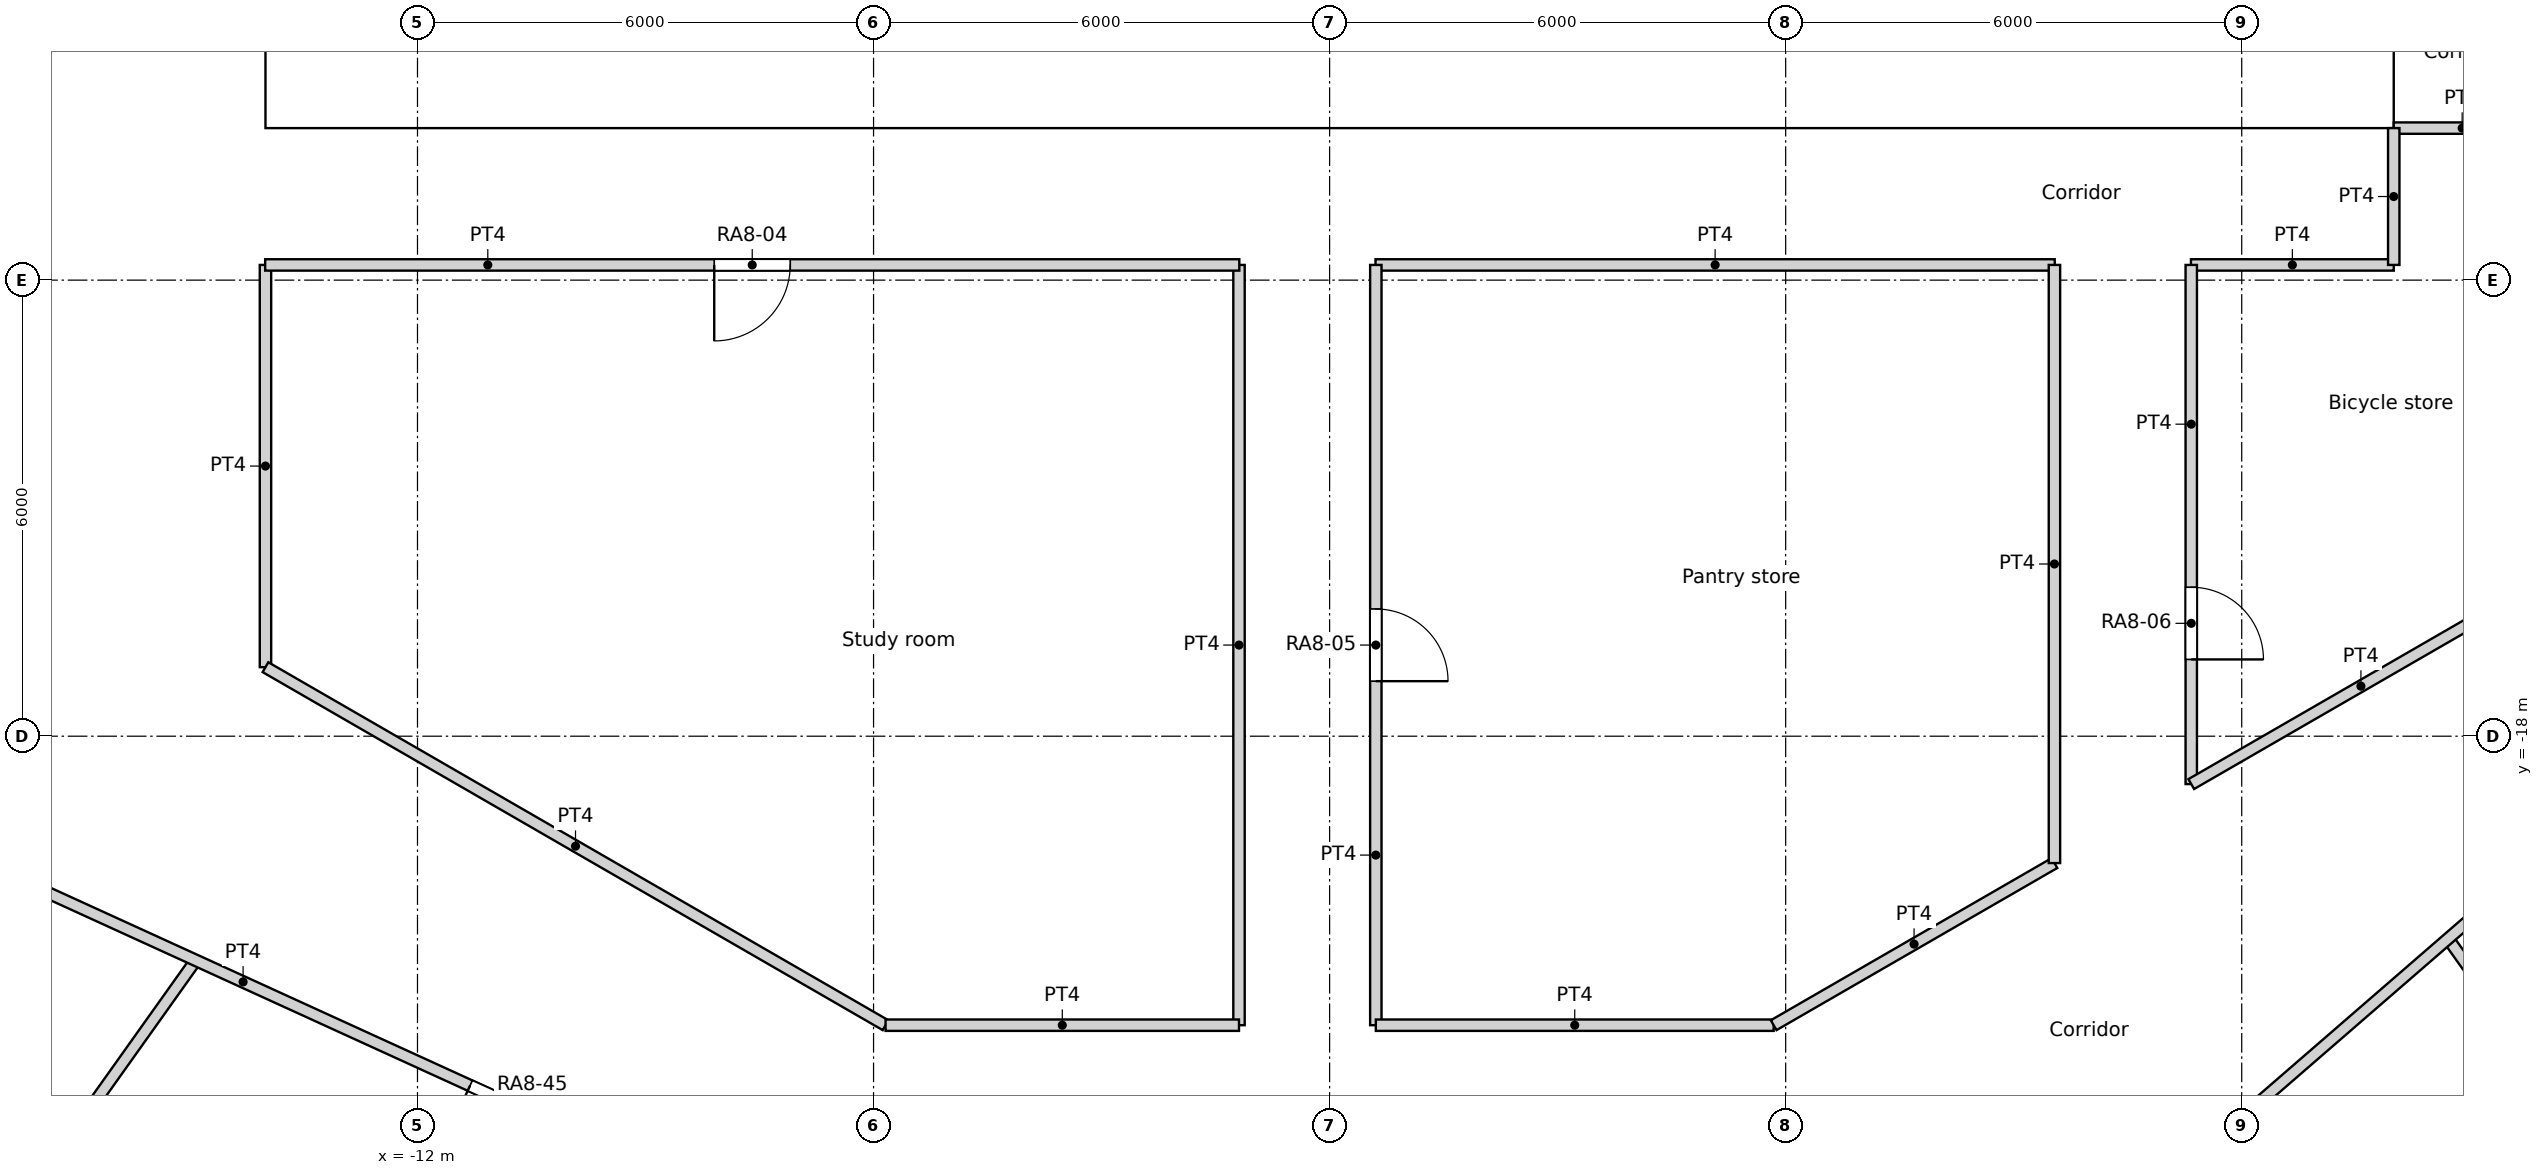
"""IFC4 building model, lengths in metres.
Left out: names, types, materials, properties, quantities, classifications, styles, units other than length and angle.
Written with IfcOpenShell. Run it as: python <this file> out.ifc"""

import sys

from ifc_helpers import new_model, si_unit, direction, frame, frame_2d, origin, origin_2d, place, context, subcontext, project, spatial, rectangle, circle, extrude, element, fill, save


model = new_model("IFC4")
c1 = context("Model", 3, precision=1e-05, world=origin(), true_north=direction((0.0, 1.0)))
c2 = subcontext(c1, "Body", "Model", "MODEL_VIEW")
j1 = project(units=[si_unit("LENGTHUNIT", "METRE"), si_unit("PLANEANGLEUNIT", "RADIAN")], contexts=[c1])
p1 = place(None, origin())
s1 = spatial("IfcSite", under=j1, at=p1, CompositionType="ELEMENT")
p2 = place(p1, origin())
s2 = spatial("IfcBuilding", under=s1, at=p2, CompositionType="ELEMENT")
p3 = place(p2, frame((0.0, 0.0, 103.8)))
s3 = spatial("IfcBuildingStorey", under=s2, at=p3, CompositionType="ELEMENT", Elevation=103.8)
for number, where, z_axis, x_axis in (
    (1, (-16.846, -17.855, 0.0), (0.0, 0.0, 1.0), (1.0, 0.0, 0.0)),
    (2, (-12.274, -21.259, 0.0), (0.0, 0.0, 1.0), (1.0, 0.0, 0.0)),
    (3, (9.723, -22.54, 0.0), (0.0, 0.0, 1.0), (1.0, 0.0, 0.0)),
    (4, (14.659, -19.69, 0.0), (0.0, 0.0, 1.0), (1.0, 0.0, 0.0)),
):
    element("IfcColumn", number, at=place(p3, frame(where, z_axis=z_axis, x_axis=x_axis)), inside=s3, PredefinedType="COLUMN", context=c2, shape_type="SweptSolid", body=[
        extrude(circle(Radius=0.65, at=origin_2d()), origin(), (0.0, 0.0, 1.0), 3.6),
    ])
for number, where, z_axis, x_axis in (
    (5, (-13.798, -12.802, 0.0), (0.0, 0.0, 1.0), (1.0, 0.0, 0.0)),
    (6, (-9.411, -16.301, 0.0), (0.0, 0.0, 1.0), (1.0, 0.0, 0.0)),
    (7, (-4.188, -18.35, 0.0), (0.0, 0.0, 1.0), (1.0, 0.0, 0.0)),
    (8, (1.406, -18.77, 0.0), (0.0, 0.0, 1.0), (1.0, 0.0, 0.0)),
    (9, (6.876, -17.521, 0.0), (0.0, 0.0, 1.0), (1.0, 0.0, 0.0)),
    (10, (11.735, -14.716, 0.0), (0.0, 0.0, 1.0), (1.0, 0.0, 0.0)),
    (11, (15.552, -10.603, 0.0), (0.0, 0.0, 1.0), (1.0, 0.0, 0.0)),
):
    element("IfcColumn", number, at=place(p3, frame(where, z_axis=z_axis, x_axis=x_axis)), inside=s3, PredefinedType="COLUMN", context=c2, shape_type="SweptSolid", body=[
        extrude(circle(Radius=0.7, at=origin_2d()), origin(), (0.0, 0.0, 1.0), 3.6),
    ])
p4 = place(p3, frame((-14.0, -9.4, 0.0), z_axis=(0.0, 0.0, 1.0), x_axis=(1.0, 0.0, 0.0)))
e12 = element("IfcWall", 12, at=p4, inside=s3, PredefinedType="SOLIDWALL", context=c2, shape_type="SweptSolid", body=[
    extrude(rectangle(XDim=28.0, YDim=1.2, at=frame_2d((14.0, 0.0))), origin(), (0.0, 0.0, 1.0), 3.6),
])
p5 = place(p4, frame((14.9, 0.0, 0.0)))
e13 = element("IfcOpeningElement", 13, at=p5, cuts=e12, PredefinedType="OPENING", context=c2, shape_type="SweptSolid", body=[
    extrude(rectangle(XDim=1.0, YDim=2.1, at=frame_2d((0.5, 1.05))), frame((0.0, 0.6, 0.0), z_axis=(0.0, -1.0, 0.0), x_axis=(1.0, 0.0, 0.0)), (0.0, 0.0, 1.0), 1.2),
])
p6 = place(p4, frame((9.8, 0.0, 0.0)))
e14 = element("IfcOpeningElement", 14, at=p6, cuts=e12, PredefinedType="OPENING", context=c2, shape_type="SweptSolid", body=[
    extrude(rectangle(XDim=1.8, YDim=2.1, at=frame_2d((0.9, 1.05))), frame((0.0, 0.6, 0.0), z_axis=(0.0, -1.0, 0.0), x_axis=(1.0, 0.0, 0.0)), (0.0, 0.0, 1.0), 1.2),
])
p7 = place(p4, frame((16.4, 0.0, 0.0)))
e15 = element("IfcOpeningElement", 15, at=p7, cuts=e12, PredefinedType="OPENING", context=c2, shape_type="SweptSolid", body=[
    extrude(rectangle(XDim=1.8, YDim=2.1, at=frame_2d((0.9, 1.05))), frame((0.0, 0.6, 0.0), z_axis=(0.0, -1.0, 0.0), x_axis=(1.0, 0.0, 0.0)), (0.0, 0.0, 1.0), 1.2),
])
p8 = place(p3, frame((-14.004, -11.8, 0.0), z_axis=(0.0, 0.0, 1.0), x_axis=(1.0, 0.0, 0.0)))
e16 = element("IfcWall", 16, at=p8, inside=s3, PredefinedType="PARTITIONING", context=c2, shape_type="SweptSolid", body=[
    extrude(rectangle(XDim=12.816, YDim=0.15, at=frame_2d((6.408, 0.0))), origin(), (0.0, 0.0, 1.0), 3.15),
])
p9 = place(p8, frame((5.908, 0.0, 0.0)))
e17 = element("IfcOpeningElement", 17, at=p9, cuts=e16, PredefinedType="OPENING", context=c2, shape_type="SweptSolid", body=[
    extrude(rectangle(XDim=1.0, YDim=2.04, at=frame_2d((0.5, 1.02))), frame((0.0, 0.075, 0.0), z_axis=(0.0, -1.0, 0.0), x_axis=(1.0, 0.0, 0.0)), (0.0, 0.0, 1.0), 0.15),
])
p10 = place(p3, frame((0.604, -11.8, 0.0), z_axis=(0.0, 0.0, 1.0), x_axis=(1.0, 0.0, 0.0)))
e18 = element("IfcWall", 18, at=p10, inside=s3, PredefinedType="PARTITIONING", context=c2, shape_type="SweptSolid", body=[
    extrude(rectangle(XDim=8.936, YDim=0.15, at=frame_2d((4.468, 0.0))), origin(), (0.0, 0.0, 1.0), 3.15),
])
p11 = place(p3, frame((14.0, -11.8, 0.0), z_axis=(0.0, 0.0, 1.0), x_axis=(0.0, 1.0, 0.0)))
e19 = element("IfcWall", 19, at=p11, inside=s3, PredefinedType="PARTITIONING", context=c2, shape_type="SweptSolid", body=[
    extrude(rectangle(XDim=1.8, YDim=0.15, at=frame_2d((0.9, 0.0))), origin(), (0.0, 0.0, 1.0), 3.15),
])
p12 = place(p3, frame((11.332, -11.8, 0.0), z_axis=(0.0, 0.0, 1.0), x_axis=(1.0, 0.0, 0.0)))
e20 = element("IfcWall", 20, at=p12, inside=s3, PredefinedType="PARTITIONING", context=c2, shape_type="SweptSolid", body=[
    extrude(rectangle(XDim=2.668, YDim=0.15, at=frame_2d((1.334, 0.0))), origin(), (0.0, 0.0, 1.0), 3.15),
])
p13 = place(p3, frame((14.0, -10.0, 0.0), z_axis=(0.0, 0.0, 1.0), x_axis=(1.0, 0.0, 0.0)))
e21 = element("IfcWall", 21, at=p13, inside=s3, PredefinedType="PARTITIONING", context=c2, shape_type="SweptSolid", body=[
    extrude(rectangle(XDim=1.8, YDim=0.15, at=frame_2d((0.9, 0.0))), origin(), (0.0, 0.0, 1.0), 3.15),
])
p14 = place(p3, frame((10.933, -23.94, 0.0), z_axis=(0.0, 0.0, 1.0), x_axis=(0.755770011705, 0.654837147242, 0.0)))
e22 = element("IfcWall", 22, at=p14, inside=s3, PredefinedType="PARTITIONING", context=c2, shape_type="SweptSolid", body=[
    extrude(rectangle(XDim=14.83, YDim=0.15, at=frame_2d((7.415, 0.0))), origin(), (0.0, 0.0, 1.0), 3.15),
])
p15 = place(p14, frame((11.976, 0.0, 0.0)))
e23 = element("IfcOpeningElement", 23, at=p15, cuts=e22, PredefinedType="OPENING", context=c2, shape_type="SweptSolid", body=[
    extrude(rectangle(XDim=1.8, YDim=2.1, at=frame_2d((0.9, 1.05))), frame((0.0, 0.075, 0.0), z_axis=(0.0, -1.0, 0.0), x_axis=(1.0, 0.0, 0.0)), (0.0, 0.0, 1.0), 0.15),
])
p16 = place(p3, frame((-14.0, -17.092, 0.0), z_axis=(0.0, 0.0, 1.0), x_axis=(0.0, 1.0, 0.0)))
e24 = element("IfcWall", 24, at=p16, inside=s3, PredefinedType="PARTITIONING", context=c2, shape_type="SweptSolid", body=[
    extrude(rectangle(XDim=5.292, YDim=0.15, at=frame_2d((2.646, 0.0))), origin(), (0.0, 0.0, 1.0), 3.15),
])
p17 = place(p3, frame((-14.0, -17.092, 0.0), z_axis=(0.0, 0.0, 1.0), x_axis=(0.86602719091, -0.499996904595, 0.0)))
e25 = element("IfcWall", 25, at=p17, inside=s3, PredefinedType="PARTITIONING", context=c2, shape_type="SweptSolid", body=[
    extrude(rectangle(XDim=9.42, YDim=0.15, at=frame_2d((4.71, 0.0))), origin(), (0.0, 0.0, 1.0), 3.15),
])
p18 = place(p3, frame((-5.842, -21.802, 0.0), z_axis=(0.0, 0.0, 1.0), x_axis=(1.0, 0.0, 0.0)))
e26 = element("IfcWall", 26, at=p18, inside=s3, PredefinedType="PARTITIONING", context=c2, shape_type="SweptSolid", body=[
    extrude(rectangle(XDim=4.65, YDim=0.15, at=frame_2d((2.325, 0.0))), origin(), (0.0, 0.0, 1.0), 3.15),
])
p19 = place(p3, frame((-1.192, -21.802, 0.0), z_axis=(0.0, 0.0, 1.0), x_axis=(0.0, 1.0, 0.0)))
e27 = element("IfcWall", 27, at=p19, inside=s3, PredefinedType="PARTITIONING", context=c2, shape_type="SweptSolid", body=[
    extrude(rectangle(XDim=10.002, YDim=0.15, at=frame_2d((5.001, 0.0))), origin(), (0.0, 0.0, 1.0), 3.15),
])
p20 = place(p3, frame((0.608, -21.802, 0.0), z_axis=(0.0, 0.0, 1.0), x_axis=(0.0, 1.0, 0.0)))
e28 = element("IfcWall", 28, at=p20, inside=s3, PredefinedType="PARTITIONING", context=c2, shape_type="SweptSolid", body=[
    extrude(rectangle(XDim=10.002, YDim=0.15, at=frame_2d((5.001, 0.0))), origin(), (0.0, 0.0, 1.0), 3.15),
])
p21 = place(p20, frame((4.526, 0.0, 0.0)))
e29 = element("IfcOpeningElement", 29, at=p21, cuts=e28, PredefinedType="OPENING", context=c2, shape_type="SweptSolid", body=[
    extrude(rectangle(XDim=0.95, YDim=2.1, at=frame_2d((0.475, 1.05))), frame((0.0, 0.075, 0.0), z_axis=(0.0, -1.0, 0.0), x_axis=(1.0, 0.0, 0.0)), (0.0, 0.0, 1.0), 0.15),
])
p22 = place(p3, frame((0.608, -21.802, 0.0), z_axis=(0.0, 0.0, 1.0), x_axis=(1.0, 0.0, 0.0)))
e30 = element("IfcWall", 30, at=p22, inside=s3, PredefinedType="PARTITIONING", context=c2, shape_type="SweptSolid", body=[
    extrude(rectangle(XDim=5.234, YDim=0.15, at=frame_2d((2.617, 0.0))), origin(), (0.0, 0.0, 1.0), 3.15),
])
p23 = place(p3, frame((5.842, -21.802, 0.0), z_axis=(0.0, 0.0, 1.0), x_axis=(0.865983505205, 0.500072563448, 0.0)))
e31 = element("IfcWall", 31, at=p23, inside=s3, PredefinedType="PARTITIONING", context=c2, shape_type="SweptSolid", body=[
    extrude(rectangle(XDim=4.265, YDim=0.15, at=frame_2d((2.133, 0.0))), origin(), (0.0, 0.0, 1.0), 3.15),
])
p24 = place(p3, frame((9.536, -19.669, 0.0), z_axis=(0.0, 0.0, 1.0), x_axis=(0.0, 1.0, 0.0)))
e32 = element("IfcWall", 32, at=p24, inside=s3, PredefinedType="PARTITIONING", context=c2, shape_type="SweptSolid", body=[
    extrude(rectangle(XDim=7.869, YDim=0.15, at=frame_2d((3.935, 0.0))), origin(), (0.0, 0.0, 1.0), 3.15),
])
p25 = place(p3, frame((11.336, -18.63, 0.0), z_axis=(0.0, 0.0, 1.0), x_axis=(0.0, 1.0, 0.0)))
e33 = element("IfcWall", 33, at=p25, inside=s3, PredefinedType="PARTITIONING", context=c2, shape_type="SweptSolid", body=[
    extrude(rectangle(XDim=6.83, YDim=0.15, at=frame_2d((3.415, 0.0))), origin(), (0.0, 0.0, 1.0), 3.15),
])
p26 = place(p25, frame((1.64, 0.0, 0.0)))
e34 = element("IfcOpeningElement", 34, at=p26, cuts=e33, PredefinedType="OPENING", context=c2, shape_type="SweptSolid", body=[
    extrude(rectangle(XDim=0.95, YDim=2.1, at=frame_2d((0.475, 1.05))), frame((0.0, 0.075, 0.0), z_axis=(0.0, -1.0, 0.0), x_axis=(1.0, 0.0, 0.0)), (0.0, 0.0, 1.0), 0.15),
])
p27 = place(p3, frame((11.336, -18.63, 0.0), z_axis=(0.0, 0.0, 1.0), x_axis=(0.866063337164, 0.499934291702, 0.0)))
e35 = element("IfcWall", 35, at=p27, inside=s3, PredefinedType="PARTITIONING", context=c2, shape_type="SweptSolid", body=[
    extrude(rectangle(XDim=5.155, YDim=0.15, at=frame_2d((2.577, 0.0))), origin(), (0.0, 0.0, 1.0), 3.15),
])
p28 = place(p3, frame((-17.235, -19.89, 0.0), z_axis=(0.0, 0.0, 1.0), x_axis=(0.909624174921, -0.415432136936, 0.0)))
e36 = element("IfcWall", 36, at=p28, inside=s3, PredefinedType="PARTITIONING", context=c2, shape_type="SweptSolid", body=[
    extrude(rectangle(XDim=14.83, YDim=0.15, at=frame_2d((7.415, 0.0))), origin(), (0.0, 0.0, 1.0), 3.15),
])
p29 = place(p28, frame((6.515, 0.0, 0.0)))
e37 = element("IfcOpeningElement", 37, at=p29, cuts=e36, PredefinedType="OPENING", context=c2, shape_type="SweptSolid", body=[
    extrude(rectangle(XDim=1.8, YDim=2.1, at=frame_2d((0.9, 1.05))), frame((0.0, 0.075, 0.0), z_axis=(0.0, -1.0, 0.0), x_axis=(1.0, 0.0, 0.0)), (0.0, 0.0, 1.0), 0.15),
])
p30 = place(p3, frame((-18.112, -25.435, 0.0), z_axis=(0.0, 0.0, 1.0), x_axis=(0.580004598464, 0.81461320009, 0.0)))
e38 = element("IfcWall", 38, at=p30, inside=s3, PredefinedType="PARTITIONING", context=c2, shape_type="SweptSolid", body=[
    extrude(rectangle(XDim=5.507, YDim=0.15, at=frame_2d((2.753, 0.0))), origin(), (0.0, 0.0, 1.0), 3.15),
])
p31 = place(p3, frame((14.715, -20.664, 0.0), z_axis=(0.0, 0.0, 1.0), x_axis=(0.580007254017, -0.814611309329, 0.0)))
e39 = element("IfcWall", 39, at=p31, inside=s3, PredefinedType="PARTITIONING", context=c2, shape_type="SweptSolid", body=[
    extrude(rectangle(XDim=5.857, YDim=0.15, at=frame_2d((2.928, 0.0))), origin(), (0.0, 0.0, 1.0), 3.15),
])
p32 = place(p5, origin())
e40 = element("IfcDoor", 40, at=p32, inside=s3, OperationType="SINGLE_SWING_LEFT", PredefinedType="DOOR", context=c2, shape_type="SweptSolid", body=[
    extrude(rectangle(XDim=1.0, YDim=2.1, at=frame_2d((0.5, 1.05))), frame((0.0, 0.025, 0.0), z_axis=(0.0, -1.0, 0.0), x_axis=(1.0, 0.0, 0.0)), (0.0, 0.0, 1.0), 0.05),
])
fill(e13, e40)
p33 = place(p6, origin())
e41 = element("IfcDoor", 41, at=p33, inside=s3, OperationType="DOUBLE_DOOR_SINGLE_SWING", PredefinedType="DOOR", context=c2, shape_type="SweptSolid", body=[
    extrude(rectangle(XDim=1.8, YDim=2.1, at=frame_2d((0.9, 1.05))), frame((0.0, 0.025, 0.0), z_axis=(0.0, -1.0, 0.0), x_axis=(1.0, 0.0, 0.0)), (0.0, 0.0, 1.0), 0.05),
])
fill(e14, e41)
p34 = place(p7, origin())
e42 = element("IfcDoor", 42, at=p34, inside=s3, OperationType="DOUBLE_DOOR_SINGLE_SWING", PredefinedType="DOOR", context=c2, shape_type="SweptSolid", body=[
    extrude(rectangle(XDim=1.8, YDim=2.1, at=frame_2d((0.9, 1.05))), frame((0.0, 0.025, 0.0), z_axis=(0.0, -1.0, 0.0), x_axis=(1.0, 0.0, 0.0)), (0.0, 0.0, 1.0), 0.05),
])
fill(e15, e42)
p35 = place(p9, origin())
e43 = element("IfcDoor", 43, at=p35, inside=s3, OperationType="SINGLE_SWING_RIGHT", PredefinedType="DOOR", context=c2, shape_type="SweptSolid", body=[
    extrude(rectangle(XDim=1.0, YDim=2.04, at=frame_2d((0.5, 1.02))), frame((0.0, 0.025, 0.0), z_axis=(0.0, -1.0, 0.0), x_axis=(1.0, 0.0, 0.0)), (0.0, 0.0, 1.0), 0.05),
])
fill(e17, e43)
p36 = place(p21, origin())
e44 = element("IfcDoor", 44, at=p36, inside=s3, OperationType="SINGLE_SWING_RIGHT", PredefinedType="DOOR", context=c2, shape_type="SweptSolid", body=[
    extrude(rectangle(XDim=0.95, YDim=2.1, at=frame_2d((0.475, 1.05))), frame((0.0, 0.025, 0.0), z_axis=(0.0, -1.0, 0.0), x_axis=(1.0, 0.0, 0.0)), (0.0, 0.0, 1.0), 0.05),
])
fill(e29, e44)
p37 = place(p26, origin())
e45 = element("IfcDoor", 45, at=p37, inside=s3, OperationType="SINGLE_SWING_RIGHT", PredefinedType="DOOR", context=c2, shape_type="SweptSolid", body=[
    extrude(rectangle(XDim=0.95, YDim=2.1, at=frame_2d((0.475, 1.05))), frame((0.0, 0.025, 0.0), z_axis=(0.0, -1.0, 0.0), x_axis=(1.0, 0.0, 0.0)), (0.0, 0.0, 1.0), 0.05),
])
fill(e34, e45)
p38 = place(p29, origin())
e46 = element("IfcDoor", 46, at=p38, inside=s3, OperationType="DOUBLE_DOOR_SINGLE_SWING", PredefinedType="DOOR", context=c2, shape_type="SweptSolid", body=[
    extrude(rectangle(XDim=1.8, YDim=2.1, at=frame_2d((0.9, 1.05))), frame((0.0, 0.025, 0.0), z_axis=(0.0, -1.0, 0.0), x_axis=(1.0, 0.0, 0.0)), (0.0, 0.0, 1.0), 0.05),
])
fill(e37, e46)
save(model, sys.argv[1])
